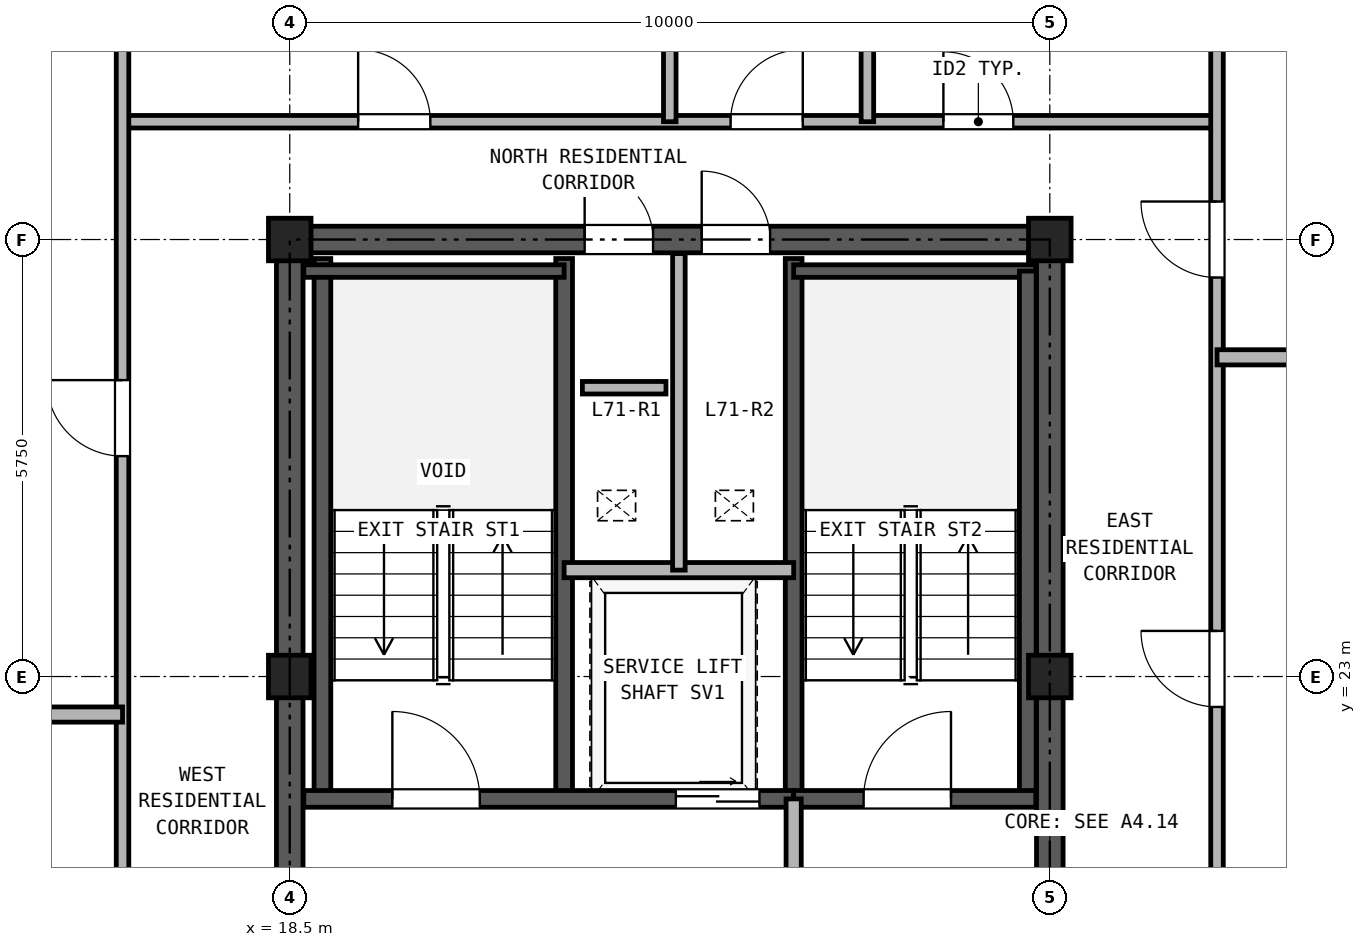
"""IFC4 building model, lengths in metres.
Left out: names, types, materials, properties, quantities, classifications, styles, units other than length and angle.
Written with IfcOpenShell. Run it as: python <this file> out.ifc"""

import sys

from ifc_helpers import new_model, si_unit, direction, frame, frame_2d, origin, origin_2d, place, context, subcontext, project, spatial, rectangle, hollow_rectangle, extrude, source, transform, mapped, element, fill, save


model = new_model("IFC4")
c1 = context("Model", 3, precision=1e-05, world=origin(), true_north=direction((0.0, 1.0)))
c2 = subcontext(c1, "Body", "Model", "MODEL_VIEW")
j1 = project(units=[si_unit("LENGTHUNIT", "METRE"), si_unit("PLANEANGLEUNIT", "RADIAN")], contexts=[c1])
p1 = place(None, origin())
s1 = spatial("IfcSite", under=j1, at=p1, CompositionType="ELEMENT")
p2 = place(p1, origin())
s2 = spatial("IfcBuilding", under=s1, at=p2, CompositionType="ELEMENT")
p3 = place(p2, frame((0.0, 0.0, 248.9)))
s3 = spatial("IfcBuildingStorey", under=s2, at=p3, CompositionType="ELEMENT", Elevation=248.9)
m1 = source(origin(), c2, "Body", "SweptSolid", [
    extrude(hollow_rectangle(XDim=0.56, YDim=0.56, WallThickness=0.03, at=origin_2d()), origin(), (0.0, 0.0, 1.0), 2.98),
])
for number, where, z_axis, x_axis in (
    (1, (18.5, 23.0, 0.0), (0.0, 0.0, 1.0), (1.0, 0.0, 0.0)),
    (2, (18.5, 28.75, 0.0), (0.0, 0.0, 1.0), (1.0, 0.0, 0.0)),
    (3, (28.5, 23.0, 0.0), (0.0, 0.0, 1.0), (1.0, 0.0, 0.0)),
    (4, (28.5, 28.75, 0.0), (0.0, 0.0, 1.0), (1.0, 0.0, 0.0)),
):
    element("IfcColumn", number, at=place(p3, frame(where, z_axis=z_axis, x_axis=x_axis)), inside=s3, PredefinedType="COLUMN", context=c2, shape_type="MappedRepresentation", body=[
        mapped(m1, transform((0.0, 0.0, 0.0), x_axis=(1.0, 0.0, 0.0), y_axis=(0.0, 1.0, 0.0), z_axis=(0.0, 0.0, 1.0), scale=1.0)),
    ])
p4 = place(p3, frame((18.325, 28.75, 0.0), z_axis=(0.0, 0.0, 1.0), x_axis=(1.0, 0.0, 0.0)))
e5 = element("IfcWall", 5, at=p4, inside=s3, PredefinedType="SHEAR", context=c2, shape_type="SweptSolid", body=[
    extrude(rectangle(XDim=10.35, YDim=0.35, at=frame_2d((5.175, 0.0))), origin(), (0.0, 0.0, 1.0), 2.98),
])
p5 = place(p4, frame((4.055, 0.0, 0.0)))
e6 = element("IfcOpeningElement", 6, at=p5, cuts=e5, PredefinedType="OPENING", context=c2, shape_type="SweptSolid", body=[
    extrude(rectangle(XDim=0.9, YDim=2.05, at=frame_2d((0.45, 1.025))), frame((0.0, 0.185, 0.0), z_axis=(0.0, -1.0, 0.0), x_axis=(1.0, 0.0, 0.0)), (0.0, 0.0, 1.0), 0.37),
])
p6 = place(p4, frame((5.595, 0.0, 0.0)))
e7 = element("IfcOpeningElement", 7, at=p6, cuts=e5, PredefinedType="OPENING", context=c2, shape_type="SweptSolid", body=[
    extrude(rectangle(XDim=0.9, YDim=2.05, at=frame_2d((0.45, 1.025))), frame((0.0, 0.185, 0.0), z_axis=(0.0, -1.0, 0.0), x_axis=(1.0, 0.0, 0.0)), (0.0, 0.0, 1.0), 0.37),
])
p7 = place(p3, frame((18.5, 11.675, 0.0), z_axis=(0.0, 0.0, 1.0), x_axis=(0.0, 1.0, 0.0)))
e8 = element("IfcWall", 8, at=p7, inside=s3, PredefinedType="SHEAR", context=c2, shape_type="SweptSolid", body=[
    extrude(rectangle(XDim=16.9, YDim=0.35, at=frame_2d((8.45, 0.0))), origin(), (0.0, 0.0, 1.0), 2.98),
])
p8 = place(p7, frame((7.475, 0.0, 0.0)))
e9 = element("IfcOpeningElement", 9, at=p8, cuts=e8, PredefinedType="OPENING", context=c2, shape_type="SweptSolid", body=[
    extrude(rectangle(XDim=1.15, YDim=2.2, at=frame_2d((0.575, 1.1))), frame((0.0, 0.185, 0.0), z_axis=(0.0, -1.0, 0.0), x_axis=(1.0, 0.0, 0.0)), (0.0, 0.0, 1.0), 0.37),
])
p9 = place(p3, frame((28.5, 11.675, 0.0), z_axis=(0.0, 0.0, 1.0), x_axis=(0.0, 1.0, 0.0)))
e10 = element("IfcWall", 10, at=p9, inside=s3, PredefinedType="SHEAR", context=c2, shape_type="SweptSolid", body=[
    extrude(rectangle(XDim=16.9, YDim=0.35, at=frame_2d((8.45, 0.0))), origin(), (0.0, 0.0, 1.0), 2.98),
])
p10 = place(p9, frame((7.475, 0.0, 0.0)))
e11 = element("IfcOpeningElement", 11, at=p10, cuts=e10, PredefinedType="OPENING", context=c2, shape_type="SweptSolid", body=[
    extrude(rectangle(XDim=1.15, YDim=2.2, at=frame_2d((0.575, 1.1))), frame((0.0, 0.185, 0.0), z_axis=(0.0, -1.0, 0.0), x_axis=(1.0, 0.0, 0.0)), (0.0, 0.0, 1.0), 0.37),
])
for number, where, z_axis, x_axis in (
    (12, (18.93, 21.39, 0.0), (0.0, 0.0, 1.0), (0.0, 1.0, 0.0)),
    (13, (22.11, 21.39, 0.0), (0.0, 0.0, 1.0), (0.0, 1.0, 0.0)),
    (14, (25.13, 21.39, 0.0), (0.0, 0.0, 1.0), (0.0, 1.0, 0.0)),
):
    element("IfcWall", number, at=place(p3, frame(where, z_axis=z_axis, x_axis=x_axis)), inside=s3, PredefinedType="SOLIDWALL", context=c2, shape_type="SweptSolid", body=[
        extrude(rectangle(XDim=7.11, YDim=0.22, at=frame_2d((3.555, 0.0))), origin(), (0.0, 0.0, 1.0), 2.98),
    ])
p11 = place(p3, frame((18.685, 28.335, 0.0), z_axis=(0.0, 0.0, 1.0), x_axis=(1.0, 0.0, 0.0)))
e15 = element("IfcWall", 15, at=p11, inside=s3, PredefinedType="PARTITIONING", context=c2, shape_type="SweptSolid", body=[
    extrude(rectangle(XDim=3.425, YDim=0.165, at=frame_2d((1.712, 0.0))), origin(), (0.0, 0.0, 1.0), 2.98),
])
p12 = place(p3, frame((25.13, 28.335, 0.0), z_axis=(0.0, 0.0, 1.0), x_axis=(1.0, 0.0, 0.0)))
e16 = element("IfcWall", 16, at=p12, inside=s3, PredefinedType="PARTITIONING", context=c2, shape_type="SweptSolid", body=[
    extrude(rectangle(XDim=3.185, YDim=0.165, at=frame_2d((1.593, 0.0))), origin(), (0.0, 0.0, 1.0), 2.98),
])
p13 = place(p3, frame((28.21, 21.39, 0.0), z_axis=(0.0, 0.0, 1.0), x_axis=(0.0, 1.0, 0.0)))
e17 = element("IfcWall", 17, at=p13, inside=s3, PredefinedType="SOLIDWALL", context=c2, shape_type="SweptSolid", body=[
    extrude(rectangle(XDim=6.945, YDim=0.22, at=frame_2d((3.473, 0.0))), origin(), (0.0, 0.0, 1.0), 2.98),
])
p14 = place(p3, frame((18.685, 21.39, 0.0), z_axis=(0.0, 0.0, 1.0), x_axis=(1.0, 0.0, 0.0)))
e18 = element("IfcWall", 18, at=p14, inside=s3, PredefinedType="SOLIDWALL", context=c2, shape_type="SweptSolid", body=[
    extrude(rectangle(XDim=6.445, YDim=0.22, at=frame_2d((3.222, 0.0))), origin(), (0.0, 0.0, 1.0), 2.98),
])
p15 = place(p14, frame((1.165, 0.0, 0.0)))
e19 = element("IfcOpeningElement", 19, at=p15, cuts=e18, PredefinedType="OPENING", context=c2, shape_type="SweptSolid", body=[
    extrude(rectangle(XDim=1.15, YDim=2.2, at=frame_2d((0.575, 1.1))), frame((0.0, 0.12, 0.0), z_axis=(0.0, -1.0, 0.0), x_axis=(1.0, 0.0, 0.0)), (0.0, 0.0, 1.0), 0.24),
])
p16 = place(p14, frame((4.895, 0.0, 0.0)))
e20 = element("IfcOpeningElement", 20, at=p16, cuts=e18, PredefinedType="OPENING", context=c2, shape_type="SweptSolid", body=[
    extrude(rectangle(XDim=1.1, YDim=2.25, at=frame_2d((0.55, 1.125))), frame((0.0, 0.12, 0.0), z_axis=(0.0, -1.0, 0.0), x_axis=(1.0, 0.0, 0.0)), (0.0, 0.0, 1.0), 0.24),
])
p17 = place(p3, frame((25.13, 21.39, 0.0), z_axis=(0.0, 0.0, 1.0), x_axis=(1.0, 0.0, 0.0)))
e21 = element("IfcWall", 21, at=p17, inside=s3, PredefinedType="SOLIDWALL", context=c2, shape_type="SweptSolid", body=[
    extrude(rectangle(XDim=3.185, YDim=0.22, at=frame_2d((1.593, 0.0))), origin(), (0.0, 0.0, 1.0), 2.98),
])
p18 = place(p17, frame((0.92, 0.0, 0.0)))
e22 = element("IfcOpeningElement", 22, at=p18, cuts=e21, PredefinedType="OPENING", context=c2, shape_type="SweptSolid", body=[
    extrude(rectangle(XDim=1.15, YDim=2.2, at=frame_2d((0.575, 1.1))), frame((0.0, 0.12, 0.0), z_axis=(0.0, -1.0, 0.0), x_axis=(1.0, 0.0, 0.0)), (0.0, 0.0, 1.0), 0.24),
])
p19 = place(p3, frame((22.11, 24.4, 0.0), z_axis=(0.0, 0.0, 1.0), x_axis=(1.0, 0.0, 0.0)))
e23 = element("IfcWall", 23, at=p19, inside=s3, PredefinedType="PARTITIONING", context=c2, shape_type="SweptSolid", body=[
    extrude(rectangle(XDim=3.02, YDim=0.2, at=frame_2d((1.51, 0.0))), origin(), (0.0, 0.0, 1.0), 2.98),
])
p20 = place(p3, frame((23.62, 24.4, 0.0), z_axis=(0.0, 0.0, 1.0), x_axis=(0.0, 1.0, 0.0)))
e24 = element("IfcWall", 24, at=p20, inside=s3, PredefinedType="PARTITIONING", context=c2, shape_type="SweptSolid", body=[
    extrude(rectangle(XDim=4.165, YDim=0.165, at=frame_2d((2.083, 0.0))), origin(), (0.0, 0.0, 1.0), 2.98),
])
p21 = place(p3, frame((25.13, 18.0, 0.0), z_axis=(0.0, 0.0, 1.0), x_axis=(0.0, 1.0, 0.0)))
e25 = element("IfcWall", 25, at=p21, inside=s3, PredefinedType="PARTITIONING", context=c2, shape_type="SweptSolid", body=[
    extrude(rectangle(XDim=3.39, YDim=0.2, at=frame_2d((1.695, 0.0))), origin(), (0.0, 0.0, 1.0), 2.98),
])
p22 = place(p21, frame((1.1, 0.0, 0.0)))
e26 = element("IfcOpeningElement", 26, at=p22, cuts=e25, PredefinedType="OPENING", context=c2, shape_type="SweptSolid", body=[
    extrude(rectangle(XDim=1.15, YDim=2.2, at=frame_2d((0.575, 1.1))), frame((0.0, 0.11, 0.0), z_axis=(0.0, -1.0, 0.0), x_axis=(1.0, 0.0, 0.0)), (0.0, 0.0, 1.0), 0.22),
])
p23 = place(p3, frame((16.3, 30.3, 0.0), z_axis=(0.0, 0.0, 1.0), x_axis=(1.0, 0.0, 0.0)))
e27 = element("IfcWall", 27, at=p23, inside=s3, PredefinedType="PARTITIONING", context=c2, shape_type="SweptSolid", body=[
    extrude(rectangle(XDim=14.4, YDim=0.165, at=frame_2d((7.2, 0.0))), origin(), (0.0, 0.0, 1.0), 2.98),
])
p24 = place(p23, frame((3.1, 0.0, 0.0)))
e28 = element("IfcOpeningElement", 28, at=p24, cuts=e27, PredefinedType="OPENING", context=c2, shape_type="SweptSolid", body=[
    extrude(rectangle(XDim=0.95, YDim=2.15, at=frame_2d((0.475, 1.075))), frame((0.0, 0.093, 0.0), z_axis=(0.0, -1.0, 0.0), x_axis=(1.0, 0.0, 0.0)), (0.0, 0.0, 1.0), 0.185),
])
p25 = place(p23, frame((8.0, 0.0, 0.0)))
e29 = element("IfcOpeningElement", 29, at=p25, cuts=e27, PredefinedType="OPENING", context=c2, shape_type="SweptSolid", body=[
    extrude(rectangle(XDim=0.95, YDim=2.15, at=frame_2d((0.475, 1.075))), frame((0.0, 0.093, 0.0), z_axis=(0.0, -1.0, 0.0), x_axis=(1.0, 0.0, 0.0)), (0.0, 0.0, 1.0), 0.185),
])
p26 = place(p23, frame((10.8, 0.0, 0.0)))
e30 = element("IfcOpeningElement", 30, at=p26, cuts=e27, PredefinedType="OPENING", context=c2, shape_type="SweptSolid", body=[
    extrude(rectangle(XDim=0.92, YDim=2.1, at=frame_2d((0.46, 1.05))), frame((0.0, 0.093, 0.0), z_axis=(0.0, -1.0, 0.0), x_axis=(1.0, 0.0, 0.0)), (0.0, 0.0, 1.0), 0.185),
])
p27 = place(p3, frame((16.3, 11.2, 0.0), z_axis=(0.0, 0.0, 1.0), x_axis=(0.0, 1.0, 0.0)))
e31 = element("IfcWall", 31, at=p27, inside=s3, PredefinedType="PARTITIONING", context=c2, shape_type="SweptSolid", body=[
    extrude(rectangle(XDim=23.94, YDim=0.165, at=frame_2d((11.97, 0.0))), origin(), (0.0, 0.0, 1.0), 2.98),
])
p28 = place(p27, frame((5.15, 0.0, 0.0)))
e32 = element("IfcOpeningElement", 32, at=p28, cuts=e31, PredefinedType="OPENING", context=c2, shape_type="SweptSolid", body=[
    extrude(rectangle(XDim=1.0, YDim=2.15, at=frame_2d((0.5, 1.075))), frame((0.0, 0.093, 0.0), z_axis=(0.0, -1.0, 0.0), x_axis=(1.0, 0.0, 0.0)), (0.0, 0.0, 1.0), 0.185),
])
p29 = place(p27, frame((14.7, 0.0, 0.0)))
e33 = element("IfcOpeningElement", 33, at=p29, cuts=e31, PredefinedType="OPENING", context=c2, shape_type="SweptSolid", body=[
    extrude(rectangle(XDim=1.0, YDim=2.15, at=frame_2d((0.5, 1.075))), frame((0.0, 0.093, 0.0), z_axis=(0.0, -1.0, 0.0), x_axis=(1.0, 0.0, 0.0)), (0.0, 0.0, 1.0), 0.185),
])
p30 = place(p3, frame((30.7, 11.2, 0.0), z_axis=(0.0, 0.0, 1.0), x_axis=(0.0, 1.0, 0.0)))
e34 = element("IfcWall", 34, at=p30, inside=s3, PredefinedType="PARTITIONING", context=c2, shape_type="SweptSolid", body=[
    extrude(rectangle(XDim=23.94, YDim=0.165, at=frame_2d((11.97, 0.0))), origin(), (0.0, 0.0, 1.0), 2.98),
])
p31 = place(p30, frame((3.4, 0.0, 0.0)))
e35 = element("IfcOpeningElement", 35, at=p31, cuts=e34, PredefinedType="OPENING", context=c2, shape_type="SweptSolid", body=[
    extrude(rectangle(XDim=1.0, YDim=2.15, at=frame_2d((0.5, 1.075))), frame((0.0, 0.093, 0.0), z_axis=(0.0, -1.0, 0.0), x_axis=(1.0, 0.0, 0.0)), (0.0, 0.0, 1.0), 0.185),
])
p32 = place(p30, frame((11.4, 0.0, 0.0)))
e36 = element("IfcOpeningElement", 36, at=p32, cuts=e34, PredefinedType="OPENING", context=c2, shape_type="SweptSolid", body=[
    extrude(rectangle(XDim=1.0, YDim=2.15, at=frame_2d((0.5, 1.075))), frame((0.0, 0.093, 0.0), z_axis=(0.0, -1.0, 0.0), x_axis=(1.0, 0.0, 0.0)), (0.0, 0.0, 1.0), 0.185),
])
p33 = place(p30, frame((17.05, 0.0, 0.0)))
e37 = element("IfcOpeningElement", 37, at=p33, cuts=e34, PredefinedType="OPENING", context=c2, shape_type="SweptSolid", body=[
    extrude(rectangle(XDim=1.0, YDim=2.15, at=frame_2d((0.5, 1.075))), frame((0.0, 0.093, 0.0), z_axis=(0.0, -1.0, 0.0), x_axis=(1.0, 0.0, 0.0)), (0.0, 0.0, 1.0), 0.185),
])
for number, where, z_axis, x_axis in (
    (38, (5.36, 22.5, 0.0), (0.0, 0.0, 1.0), (1.0, 0.0, 0.0)),
    (39, (30.7, 27.2, 0.0), (0.0, 0.0, 1.0), (1.0, 0.0, 0.0)),
):
    element("IfcWall", number, at=place(p3, frame(where, z_axis=z_axis, x_axis=x_axis)), inside=s3, PredefinedType="PARTITIONING", context=c2, shape_type="SweptSolid", body=[
        extrude(rectangle(XDim=10.94, YDim=0.2, at=frame_2d((5.47, 0.0))), origin(), (0.0, 0.0, 1.0), 2.98),
    ])
for number, where, z_axis, x_axis in (
    (40, (23.5, 30.3, 0.0), (0.0, 0.0, 1.0), (0.0, 1.0, 0.0)),
    (41, (26.1, 30.3, 0.0), (0.0, 0.0, 1.0), (0.0, 1.0, 0.0)),
):
    element("IfcWall", number, at=place(p3, frame(where, z_axis=z_axis, x_axis=x_axis)), inside=s3, PredefinedType="PARTITIONING", context=c2, shape_type="SweptSolid", body=[
        extrude(rectangle(XDim=4.84, YDim=0.165, at=frame_2d((2.42, 0.0))), origin(), (0.0, 0.0, 1.0), 2.98),
    ])
p34 = place(p3, frame((22.35, 26.8, 0.0), z_axis=(0.0, 0.0, 1.0), x_axis=(1.0, 0.0, 0.0)))
e42 = element("IfcWall", 42, at=p34, inside=s3, PredefinedType="PARTITIONING", context=c2, shape_type="SweptSolid", body=[
    extrude(rectangle(XDim=1.1, YDim=0.165, at=frame_2d((0.55, 0.0))), origin(), (0.0, 0.0, 1.0), 2.98),
])
p35 = place(p15, frame((1.15, 0.0, 0.0), z_axis=(0.0, 0.0, 1.0), x_axis=(-1.0, 0.0, 0.0)))
e43 = element("IfcDoor", 43, at=p35, inside=s3, OperationType="SINGLE_SWING_LEFT", PredefinedType="DOOR", context=c2, shape_type="SweptSolid", body=[
    extrude(rectangle(XDim=1.15, YDim=2.2, at=frame_2d((0.575, 1.1))), frame((0.0, 0.025, 0.0), z_axis=(0.0, -1.0, 0.0), x_axis=(1.0, 0.0, 0.0)), (0.0, 0.0, 1.0), 0.05),
])
fill(e19, e43)
p36 = place(p18, frame((1.15, 0.0, 0.0), z_axis=(0.0, 0.0, 1.0), x_axis=(-1.0, 0.0, 0.0)))
e44 = element("IfcDoor", 44, at=p36, inside=s3, OperationType="SINGLE_SWING_RIGHT", PredefinedType="DOOR", context=c2, shape_type="SweptSolid", body=[
    extrude(rectangle(XDim=1.15, YDim=2.2, at=frame_2d((0.575, 1.1))), frame((0.0, 0.025, 0.0), z_axis=(0.0, -1.0, 0.0), x_axis=(1.0, 0.0, 0.0)), (0.0, 0.0, 1.0), 0.05),
])
fill(e22, e44)
p37 = place(p16, frame((1.1, 0.0, 0.0), z_axis=(0.0, 0.0, 1.0), x_axis=(-1.0, 0.0, 0.0)))
e45 = element("IfcDoor", 45, at=p37, inside=s3, OperationType="DOUBLE_DOOR_SLIDING", PredefinedType="DOOR", context=c2, shape_type="SweptSolid", body=[
    extrude(rectangle(XDim=1.1, YDim=2.25, at=frame_2d((0.55, 1.125))), frame((0.0, 0.025, 0.0), z_axis=(0.0, -1.0, 0.0), x_axis=(1.0, 0.0, 0.0)), (0.0, 0.0, 1.0), 0.05),
])
fill(e20, e45)
p38 = place(p5, origin())
e46 = element("IfcDoor", 46, at=p38, inside=s3, OperationType="SINGLE_SWING_LEFT", PredefinedType="DOOR", context=c2, shape_type="SweptSolid", body=[
    extrude(rectangle(XDim=0.9, YDim=2.05, at=frame_2d((0.45, 1.025))), frame((0.0, 0.025, 0.0), z_axis=(0.0, -1.0, 0.0), x_axis=(1.0, 0.0, 0.0)), (0.0, 0.0, 1.0), 0.05),
])
fill(e6, e46)
p39 = place(p6, origin())
e47 = element("IfcDoor", 47, at=p39, inside=s3, OperationType="SINGLE_SWING_LEFT", PredefinedType="DOOR", context=c2, shape_type="SweptSolid", body=[
    extrude(rectangle(XDim=0.9, YDim=2.05, at=frame_2d((0.45, 1.025))), frame((0.0, 0.025, 0.0), z_axis=(0.0, -1.0, 0.0), x_axis=(1.0, 0.0, 0.0)), (0.0, 0.0, 1.0), 0.05),
])
fill(e7, e47)
p40 = place(p29, origin())
e48 = element("IfcDoor", 48, at=p40, inside=s3, OperationType="SINGLE_SWING_RIGHT", PredefinedType="DOOR", context=c2, shape_type="SweptSolid", body=[
    extrude(rectangle(XDim=1.0, YDim=2.15, at=frame_2d((0.5, 1.075))), frame((0.0, 0.025, 0.0), z_axis=(0.0, -1.0, 0.0), x_axis=(1.0, 0.0, 0.0)), (0.0, 0.0, 1.0), 0.05),
])
fill(e33, e48)
p41 = place(p32, frame((1.0, 0.0, 0.0), z_axis=(0.0, 0.0, 1.0), x_axis=(-1.0, 0.0, 0.0)))
e49 = element("IfcDoor", 49, at=p41, inside=s3, OperationType="SINGLE_SWING_RIGHT", PredefinedType="DOOR", context=c2, shape_type="SweptSolid", body=[
    extrude(rectangle(XDim=1.0, YDim=2.15, at=frame_2d((0.5, 1.075))), frame((0.0, 0.025, 0.0), z_axis=(0.0, -1.0, 0.0), x_axis=(1.0, 0.0, 0.0)), (0.0, 0.0, 1.0), 0.05),
])
fill(e36, e49)
p42 = place(p33, frame((1.0, 0.0, 0.0), z_axis=(0.0, 0.0, 1.0), x_axis=(-1.0, 0.0, 0.0)))
e50 = element("IfcDoor", 50, at=p42, inside=s3, OperationType="SINGLE_SWING_RIGHT", PredefinedType="DOOR", context=c2, shape_type="SweptSolid", body=[
    extrude(rectangle(XDim=1.0, YDim=2.15, at=frame_2d((0.5, 1.075))), frame((0.0, 0.025, 0.0), z_axis=(0.0, -1.0, 0.0), x_axis=(1.0, 0.0, 0.0)), (0.0, 0.0, 1.0), 0.05),
])
fill(e37, e50)
p43 = place(p24, origin())
e51 = element("IfcDoor", 51, at=p43, inside=s3, OperationType="SINGLE_SWING_LEFT", PredefinedType="DOOR", context=c2, shape_type="SweptSolid", body=[
    extrude(rectangle(XDim=0.95, YDim=2.15, at=frame_2d((0.475, 1.075))), frame((0.0, 0.025, 0.0), z_axis=(0.0, -1.0, 0.0), x_axis=(1.0, 0.0, 0.0)), (0.0, 0.0, 1.0), 0.05),
])
fill(e28, e51)
p44 = place(p25, origin())
e52 = element("IfcDoor", 52, at=p44, inside=s3, OperationType="SINGLE_SWING_RIGHT", PredefinedType="DOOR", context=c2, shape_type="SweptSolid", body=[
    extrude(rectangle(XDim=0.95, YDim=2.15, at=frame_2d((0.475, 1.075))), frame((0.0, 0.025, 0.0), z_axis=(0.0, -1.0, 0.0), x_axis=(1.0, 0.0, 0.0)), (0.0, 0.0, 1.0), 0.05),
])
fill(e29, e52)
p45 = place(p26, origin())
e53 = element("IfcDoor", 53, at=p45, inside=s3, OperationType="SINGLE_SWING_LEFT", PredefinedType="DOOR", context=c2, shape_type="SweptSolid", body=[
    extrude(rectangle(XDim=0.92, YDim=2.1, at=frame_2d((0.46, 1.05))), frame((0.0, 0.025, 0.0), z_axis=(0.0, -1.0, 0.0), x_axis=(1.0, 0.0, 0.0)), (0.0, 0.0, 1.0), 0.05),
])
fill(e30, e53)
save(model, sys.argv[1])
